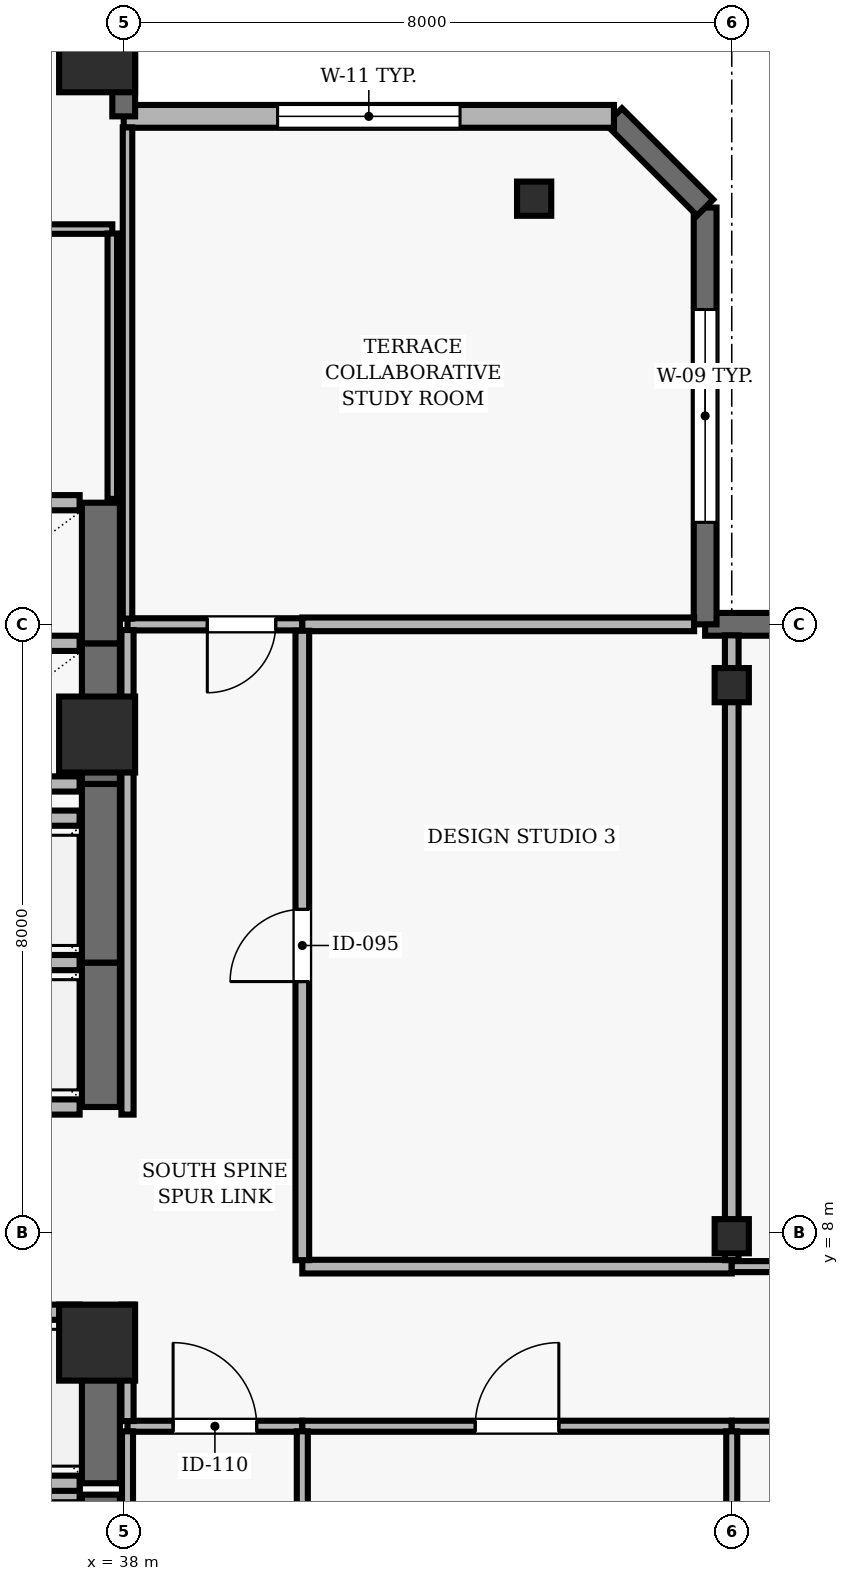
"""IFC4 building model, lengths in metres.
Left out: names, types, materials, properties, quantities, classifications, styles, units other than length and angle.
Written with IfcOpenShell. Run it as: python <this file> out.ifc"""

import sys

from ifc_helpers import new_model, si_unit, direction, frame, frame_2d, origin, origin_2d, place, context, subcontext, project, spatial, rectangle, hollow_rectangle, extrude, element, fill, save


model = new_model("IFC4")
c1 = context("Model", 3, precision=1e-05, world=origin(), true_north=direction((0.0, 1.0)))
c2 = subcontext(c1, "Body", "Model", "MODEL_VIEW")
j1 = project(units=[si_unit("LENGTHUNIT", "METRE"), si_unit("PLANEANGLEUNIT", "RADIAN")], contexts=[c1])
p1 = place(None, origin())
s1 = spatial("IfcSite", under=j1, at=p1, CompositionType="ELEMENT")
p2 = place(p1, origin())
s2 = spatial("IfcBuilding", under=s1, at=p2, CompositionType="ELEMENT")
p3 = place(p2, frame((0.0, 0.0, 210.9)))
s3 = spatial("IfcBuildingStorey", under=s2, at=p3, CompositionType="ELEMENT", Elevation=210.9)
for number, where, z_axis, x_axis in (
    (1, (37.65, 6.55, 0.0), (0.0, 0.0, 1.0), (1.0, 0.0, 0.0)),
    (2, (37.65, 14.55, 0.0), (0.0, 0.0, 1.0), (1.0, 0.0, 0.0)),
    (3, (37.65, 23.5, 0.0), (0.0, 0.0, 1.0), (1.0, 0.0, 0.0)),
):
    element("IfcColumn", number, at=place(p3, frame(where, z_axis=z_axis, x_axis=x_axis)), inside=s3, PredefinedType="COLUMN", context=c2, shape_type="SweptSolid", body=[
        extrude(rectangle(XDim=1.0, YDim=1.0, at=origin_2d()), origin(), (0.0, 0.0, 1.0), 3.9),
    ])
for number, where, z_axis, x_axis in (
    (4, (46.0, 7.95, 0.0), (0.0, 0.0, 1.0), (1.0, 0.0, 0.0)),
    (5, (46.0, 15.2, 0.0), (0.0, 0.0, 1.0), (1.0, 0.0, 0.0)),
    (6, (43.4, 21.6, 0.0), (0.0, 0.0, 1.0), (1.0, 0.0, 0.0)),
):
    element("IfcColumn", number, at=place(p3, frame(where, z_axis=z_axis, x_axis=x_axis)), inside=s3, PredefinedType="COLUMN", context=c2, shape_type="SweptSolid", body=[
        extrude(hollow_rectangle(XDim=0.45, YDim=0.45, WallThickness=0.02, at=origin_2d()), origin(), (0.0, 0.0, 1.0), 3.9),
    ])
p4 = place(p3, frame((62.7, 16.0, 0.0), z_axis=(0.0, 0.0, 1.0), x_axis=(-1.0, 0.0, 0.0)))
e7 = element("IfcWall", 7, at=p4, inside=s3, PredefinedType="SOLIDWALL", context=c2, shape_type="SweptSolid", body=[
    extrude(rectangle(XDim=17.05, YDim=0.3, at=frame_2d((8.525, 0.0))), origin(), (0.0, 0.0, 1.0), 3.69),
])
p5 = place(p4, frame((7.925, 0.0, 0.0)))
e8 = element("IfcOpeningElement", 8, at=p5, cuts=e7, PredefinedType="OPENING", context=c2, shape_type="SweptSolid", body=[
    extrude(rectangle(XDim=1.0, YDim=2.2, at=frame_2d((0.5, 1.1))), frame((0.0, 0.16, 0.0), z_axis=(0.0, -1.0, 0.0), x_axis=(1.0, 0.0, 0.0)), (0.0, 0.0, 1.0), 0.32),
])
p6 = place(p4, frame((2.542, 0.0, 0.9)))
e9 = element("IfcOpeningElement", 9, at=p6, cuts=e7, PredefinedType="OPENING", context=c2, shape_type="SweptSolid", body=[
    extrude(rectangle(XDim=2.4, YDim=1.8, at=frame_2d((1.2, 0.9))), frame((0.0, 0.16, 0.0), z_axis=(0.0, -1.0, 0.0), x_axis=(1.0, 0.0, 0.0)), (0.0, 0.0, 1.0), 0.32),
])
p7 = place(p4, frame((13.008, 0.0, 0.9)))
e10 = element("IfcOpeningElement", 10, at=p7, cuts=e7, PredefinedType="OPENING", context=c2, shape_type="SweptSolid", body=[
    extrude(rectangle(XDim=2.4, YDim=1.8, at=frame_2d((1.2, 0.9))), frame((0.0, 0.16, 0.0), z_axis=(0.0, -1.0, 0.0), x_axis=(1.0, 0.0, 0.0)), (0.0, 0.0, 1.0), 0.32),
])
p8 = place(p3, frame((45.65, 16.0, 0.0), z_axis=(0.0, 0.0, 1.0), x_axis=(0.0, 1.0, 0.0)))
e11 = element("IfcWall", 11, at=p8, inside=s3, PredefinedType="SOLIDWALL", context=c2, shape_type="SweptSolid", body=[
    extrude(rectangle(XDim=5.483, YDim=0.3, at=frame_2d((2.741, 0.0))), origin(), (0.0, 0.0, 1.0), 3.69),
])
p9 = place(p8, frame((1.342, 0.0, 0.9)))
e12 = element("IfcOpeningElement", 12, at=p9, cuts=e11, PredefinedType="OPENING", context=c2, shape_type="SweptSolid", body=[
    extrude(rectangle(XDim=2.8, YDim=1.8, at=frame_2d((1.4, 0.9))), frame((0.0, 0.16, 0.0), z_axis=(0.0, -1.0, 0.0), x_axis=(1.0, 0.0, 0.0)), (0.0, 0.0, 1.0), 0.32),
])
p10 = place(p3, frame((45.65, 21.483, 0.0), z_axis=(0.0, 0.0, 1.0), x_axis=(-0.707034851297, 0.707178703759, 0.0)))
e13 = element("IfcWall", 13, at=p10, inside=s3, PredefinedType="SOLIDWALL", context=c2, shape_type="SweptSolid", body=[
    extrude(rectangle(XDim=1.697, YDim=0.3, at=frame_2d((0.849, 0.0))), origin(), (0.0, 0.0, 1.0), 3.69),
])
p11 = place(p3, frame((44.45, 22.683, 0.0), z_axis=(0.0, 0.0, 1.0), x_axis=(-1.0, 0.0, 0.0)))
e14 = element("IfcWall", 14, at=p11, inside=s3, PredefinedType="SOLIDWALL", context=c2, shape_type="SweptSolid", body=[
    extrude(rectangle(XDim=6.45, YDim=0.3, at=frame_2d((3.225, 0.0))), origin(), (0.0, 0.0, 1.0), 3.69),
])
p12 = place(p11, frame((2.025, 0.0, 0.9)))
e15 = element("IfcOpeningElement", 15, at=p12, cuts=e14, PredefinedType="OPENING", context=c2, shape_type="SweptSolid", body=[
    extrude(rectangle(XDim=2.4, YDim=2.2, at=frame_2d((1.2, 1.1))), frame((0.0, 0.16, 0.0), z_axis=(0.0, -1.0, 0.0), x_axis=(1.0, 0.0, 0.0)), (0.0, 0.0, 1.0), 0.32),
])
p13 = place(p3, frame((38.0, 22.683, 0.0), z_axis=(0.0, 0.0, 1.0), x_axis=(0.0, 1.0, 0.0)))
e16 = element("IfcWall", 16, at=p13, inside=s3, PredefinedType="SOLIDWALL", context=c2, shape_type="SweptSolid", body=[
    extrude(rectangle(XDim=18.017, YDim=0.3, at=frame_2d((9.008, 0.0))), origin(), (0.0, 0.0, 1.0), 3.69),
])
p14 = place(p13, frame((9.708, 0.0, 0.0)))
e17 = element("IfcOpeningElement", 17, at=p14, cuts=e16, PredefinedType="OPENING", context=c2, shape_type="SweptSolid", body=[
    extrude(rectangle(XDim=1.0, YDim=2.2, at=frame_2d((0.5, 1.1))), frame((0.0, 0.16, 0.0), z_axis=(0.0, -1.0, 0.0), x_axis=(1.0, 0.0, 0.0)), (0.0, 0.0, 1.0), 0.32),
])
p15 = place(p13, frame((13.964, 0.0, 0.9)))
e18 = element("IfcOpeningElement", 18, at=p15, cuts=e16, PredefinedType="OPENING", context=c2, shape_type="SweptSolid", body=[
    extrude(rectangle(XDim=3.0, YDim=2.2, at=frame_2d((1.5, 1.1))), frame((0.0, 0.16, 0.0), z_axis=(0.0, -1.0, 0.0), x_axis=(1.0, 0.0, 0.0)), (0.0, 0.0, 1.0), 0.32),
])
p16 = place(p3, frame((37.7, 2.45, 0.0), z_axis=(0.0, 0.0, 1.0), x_axis=(0.0, 1.0, 0.0)))
e19 = element("IfcWall", 19, at=p16, inside=s3, PredefinedType="SHEAR", context=c2, shape_type="SweptSolid", body=[
    extrude(rectangle(XDim=2.1, YDim=0.5, at=frame_2d((1.05, 0.0))), origin(), (0.0, 0.0, 1.0), 3.69),
])
p17 = place(p3, frame((37.42, 4.55, 0.0), z_axis=(0.0, 0.0, 1.0), x_axis=(-1.0, 0.0, 0.0)))
e20 = element("IfcWall", 20, at=p17, inside=s3, PredefinedType="SOLIDWALL", context=c2, shape_type="SweptSolid", body=[
    extrude(rectangle(XDim=2.14, YDim=0.2, at=frame_2d((1.07, 0.0))), origin(), (0.0, 0.0, 1.0), 3.69),
])
p18 = place(p3, frame((37.7, 4.7, 0.0), z_axis=(0.0, 0.0, 1.0), x_axis=(0.0, 1.0, 0.0)))
e21 = element("IfcWall", 21, at=p18, inside=s3, PredefinedType="SHEAR", context=c2, shape_type="SweptSolid", body=[
    extrude(rectangle(XDim=2.25, YDim=0.5, at=frame_2d((1.125, 0.0))), origin(), (0.0, 0.0, 1.0), 3.69),
])
for number, where, z_axis, x_axis in (
    (22, (35.28, 4.7, 0.0), (0.0, 0.0, 1.0), (1.0, 0.0, 0.0)),
    (23, (37.42, 6.95, 0.0), (0.0, 0.0, 1.0), (-1.0, 0.0, 0.0)),
):
    element("IfcWall", number, at=place(p3, frame(where, z_axis=z_axis, x_axis=x_axis)), inside=s3, PredefinedType="SOLIDWALL", context=c2, shape_type="SweptSolid", body=[
        extrude(rectangle(XDim=2.14, YDim=0.2, at=frame_2d((1.07, 0.0))), origin(), (0.0, 0.0, 1.0), 3.69),
    ])
p19 = place(p3, frame((37.7, 9.65, 0.0), z_axis=(0.0, 0.0, 1.0), x_axis=(0.0, 1.0, 0.0)))
e24 = element("IfcWall", 24, at=p19, inside=s3, PredefinedType="SHEAR", context=c2, shape_type="SweptSolid", body=[
    extrude(rectangle(XDim=1.9, YDim=0.5, at=frame_2d((0.95, 0.0))), origin(), (0.0, 0.0, 1.0), 3.69),
])
for number, where, z_axis, x_axis in (
    (25, (35.28, 9.65, 0.0), (0.0, 0.0, 1.0), (1.0, 0.0, 0.0)),
    (26, (37.42, 11.55, 0.0), (0.0, 0.0, 1.0), (-1.0, 0.0, 0.0)),
):
    element("IfcWall", number, at=place(p3, frame(where, z_axis=z_axis, x_axis=x_axis)), inside=s3, PredefinedType="SOLIDWALL", context=c2, shape_type="SweptSolid", body=[
        extrude(rectangle(XDim=2.14, YDim=0.2, at=frame_2d((1.07, 0.0))), origin(), (0.0, 0.0, 1.0), 3.69),
    ])
p20 = place(p3, frame((37.7, 11.55, 0.0), z_axis=(0.0, 0.0, 1.0), x_axis=(0.0, 1.0, 0.0)))
e27 = element("IfcWall", 27, at=p20, inside=s3, PredefinedType="SHEAR", context=c2, shape_type="SweptSolid", body=[
    extrude(rectangle(XDim=2.35, YDim=0.5, at=frame_2d((1.175, 0.0))), origin(), (0.0, 0.0, 1.0), 3.69),
])
p21 = place(p3, frame((37.42, 13.45, 0.0), z_axis=(0.0, 0.0, 1.0), x_axis=(-1.0, 0.0, 0.0)))
e28 = element("IfcWall", 28, at=p21, inside=s3, PredefinedType="SOLIDWALL", context=c2, shape_type="SweptSolid", body=[
    extrude(rectangle(XDim=2.14, YDim=0.2, at=frame_2d((1.07, 0.0))), origin(), (0.0, 0.0, 1.0), 3.69),
])
p22 = place(p3, frame((37.7, 13.9, 0.0), z_axis=(0.0, 0.0, 1.0), x_axis=(0.0, 1.0, 0.0)))
e29 = element("IfcWall", 29, at=p22, inside=s3, PredefinedType="SHEAR", context=c2, shape_type="SweptSolid", body=[
    extrude(rectangle(XDim=1.85, YDim=0.5, at=frame_2d((0.925, 0.0))), origin(), (0.0, 0.0, 1.0), 3.69),
])
for number, where, z_axis, x_axis in (
    (30, (35.28, 13.9, 0.0), (0.0, 0.0, 1.0), (1.0, 0.0, 0.0)),
    (31, (37.42, 15.75, 0.0), (0.0, 0.0, 1.0), (-1.0, 0.0, 0.0)),
):
    element("IfcWall", number, at=place(p3, frame(where, z_axis=z_axis, x_axis=x_axis)), inside=s3, PredefinedType="SOLIDWALL", context=c2, shape_type="SweptSolid", body=[
        extrude(rectangle(XDim=2.14, YDim=0.2, at=frame_2d((1.07, 0.0))), origin(), (0.0, 0.0, 1.0), 3.69),
    ])
p23 = place(p3, frame((37.7, 15.75, 0.0), z_axis=(0.0, 0.0, 1.0), x_axis=(0.0, 1.0, 0.0)))
e32 = element("IfcWall", 32, at=p23, inside=s3, PredefinedType="SHEAR", context=c2, shape_type="SweptSolid", body=[
    extrude(rectangle(XDim=1.85, YDim=0.5, at=frame_2d((0.925, 0.0))), origin(), (0.0, 0.0, 1.0), 3.69),
])
p24 = place(p3, frame((37.42, 17.6, 0.0), z_axis=(0.0, 0.0, 1.0), x_axis=(-1.0, 0.0, 0.0)))
e33 = element("IfcWall", 33, at=p24, inside=s3, PredefinedType="SOLIDWALL", context=c2, shape_type="SweptSolid", body=[
    extrude(rectangle(XDim=2.14, YDim=0.2, at=frame_2d((1.07, 0.0))), origin(), (0.0, 0.0, 1.0), 3.69),
])
p25 = place(p3, frame((35.85, 21.2, 0.0), z_axis=(0.0, 0.0, 1.0), x_axis=(1.0, 0.0, 0.0)))
e34 = element("IfcWall", 34, at=p25, inside=s3, PredefinedType="PARTITIONING", context=c2, shape_type="SweptSolid", body=[
    extrude(rectangle(XDim=2.0, YDim=0.125, at=frame_2d((1.0, 0.0))), origin(), (0.0, 0.0, 1.0), 3.146),
])
p26 = place(p3, frame((38.05, 5.45, 0.0), z_axis=(0.0, 0.0, 1.0), x_axis=(1.0, 0.0, 0.0)))
e35 = element("IfcWall", 35, at=p26, inside=s3, PredefinedType="PARTITIONING", context=c2, shape_type="SweptSolid", body=[
    extrude(rectangle(XDim=2.3, YDim=0.145, at=frame_2d((1.15, 0.0))), origin(), (0.0, 0.0, 1.0), 3.372),
])
p27 = place(p26, frame((0.6, 0.0, 0.0)))
e36 = element("IfcOpeningElement", 36, at=p27, cuts=e35, PredefinedType="OPENING", context=c2, shape_type="SweptSolid", body=[
    extrude(rectangle(XDim=1.1, YDim=2.15, at=frame_2d((0.55, 1.075))), frame((0.0, 0.083, 0.0), z_axis=(0.0, -1.0, 0.0), x_axis=(1.0, 0.0, 0.0)), (0.0, 0.0, 1.0), 0.165),
])
p28 = place(p3, frame((40.35, 5.45, 0.0), z_axis=(0.0, 0.0, 1.0), x_axis=(1.0, 0.0, 0.0)))
e37 = element("IfcWall", 37, at=p28, inside=s3, PredefinedType="PARTITIONING", context=c2, shape_type="SweptSolid", body=[
    extrude(rectangle(XDim=5.65, YDim=0.145, at=frame_2d((2.825, 0.0))), origin(), (0.0, 0.0, 1.0), 3.372),
])
p29 = place(p28, frame((2.275, 0.0, 0.0)))
e38 = element("IfcOpeningElement", 38, at=p29, cuts=e37, PredefinedType="OPENING", context=c2, shape_type="SweptSolid", body=[
    extrude(rectangle(XDim=1.1, YDim=2.15, at=frame_2d((0.55, 1.075))), frame((0.0, 0.083, 0.0), z_axis=(0.0, -1.0, 0.0), x_axis=(1.0, 0.0, 0.0)), (0.0, 0.0, 1.0), 0.165),
])
p30 = place(p3, frame((40.35, 16.0, 0.0), z_axis=(0.0, 0.0, 1.0), x_axis=(-1.0, 0.0, 0.0)))
e39 = element("IfcWall", 39, at=p30, inside=s3, PredefinedType="PARTITIONING", context=c2, shape_type="SweptSolid", body=[
    extrude(rectangle(XDim=2.3, YDim=0.16, at=frame_2d((1.15, 0.0))), origin(), (0.0, 0.0, 1.0), 3.39),
])
p31 = place(p30, frame((0.35, 0.0, 0.0)))
e40 = element("IfcOpeningElement", 40, at=p31, cuts=e39, PredefinedType="OPENING", context=c2, shape_type="SweptSolid", body=[
    extrude(rectangle(XDim=0.9, YDim=2.1, at=frame_2d((0.45, 1.05))), frame((0.0, 0.09, 0.0), z_axis=(0.0, -1.0, 0.0), x_axis=(1.0, 0.0, 0.0)), (0.0, 0.0, 1.0), 0.18),
])
p32 = place(p3, frame((40.35, 16.0, 0.0), z_axis=(0.0, 0.0, 1.0), x_axis=(1.0, 0.0, 0.0)))
e41 = element("IfcWall", 41, at=p32, inside=s3, PredefinedType="PARTITIONING", context=c2, shape_type="SweptSolid", body=[
    extrude(rectangle(XDim=5.155, YDim=0.18, at=frame_2d((2.577, 0.0))), origin(), (0.0, 0.0, 1.0), 3.39),
])
p33 = place(p3, frame((46.0, 5.45, 0.0), z_axis=(0.0, 0.0, 1.0), x_axis=(1.0, 0.0, 0.0)))
e42 = element("IfcWall", 42, at=p33, inside=s3, PredefinedType="PARTITIONING", context=c2, shape_type="SweptSolid", body=[
    extrude(rectangle(XDim=4.79, YDim=0.145, at=frame_2d((2.395, 0.0))), origin(), (0.0, 0.0, 1.0), 3.372),
])
p34 = place(p33, frame((1.845, 0.0, 0.0)))
e43 = element("IfcOpeningElement", 43, at=p34, cuts=e42, PredefinedType="OPENING", context=c2, shape_type="SweptSolid", body=[
    extrude(rectangle(XDim=1.1, YDim=2.15, at=frame_2d((0.55, 1.075))), frame((0.0, 0.083, 0.0), z_axis=(0.0, -1.0, 0.0), x_axis=(1.0, 0.0, 0.0)), (0.0, 0.0, 1.0), 0.165),
])
p35 = place(p3, frame((46.0, 7.55, 0.0), z_axis=(0.0, 0.0, 1.0), x_axis=(-1.0, 0.0, 0.0)))
e44 = element("IfcWall", 44, at=p35, inside=s3, PredefinedType="PARTITIONING", context=c2, shape_type="SweptSolid", body=[
    extrude(rectangle(XDim=5.65, YDim=0.18, at=frame_2d((2.825, 0.0))), origin(), (0.0, 0.0, 1.0), 3.146),
])
p36 = place(p3, frame((50.79, 7.55, 0.0), z_axis=(0.0, 0.0, 1.0), x_axis=(-1.0, 0.0, 0.0)))
e45 = element("IfcWall", 45, at=p36, inside=s3, PredefinedType="PARTITIONING", context=c2, shape_type="SweptSolid", body=[
    extrude(rectangle(XDim=4.79, YDim=0.145, at=frame_2d((2.395, 0.0))), origin(), (0.0, 0.0, 1.0), 3.146),
])
p37 = place(p36, frame((1.845, 0.0, 0.0)))
e46 = element("IfcOpeningElement", 46, at=p37, cuts=e45, PredefinedType="OPENING", context=c2, shape_type="SweptSolid", body=[
    extrude(rectangle(XDim=1.1, YDim=2.15, at=frame_2d((0.55, 1.075))), frame((0.0, 0.083, 0.0), z_axis=(0.0, -1.0, 0.0), x_axis=(1.0, 0.0, 0.0)), (0.0, 0.0, 1.0), 0.165),
])
p38 = place(p3, frame((37.85, 17.65, 0.0), z_axis=(0.0, 0.0, 1.0), x_axis=(0.0, 1.0, 0.0)))
e47 = element("IfcWall", 47, at=p38, inside=s3, PredefinedType="PARTITIONING", context=c2, shape_type="SweptSolid", body=[
    extrude(rectangle(XDim=3.492, YDim=0.125, at=frame_2d((1.746, 0.0))), origin(), (0.0, 0.0, 1.0), 3.146),
])
p39 = place(p3, frame((38.05, 5.383, 0.0), z_axis=(0.0, 0.0, 1.0), x_axis=(0.0, -1.0, 0.0)))
e48 = element("IfcWall", 48, at=p39, inside=s3, PredefinedType="PARTITIONING", context=c2, shape_type="SweptSolid", body=[
    extrude(rectangle(XDim=5.238, YDim=0.145, at=frame_2d((2.619, 0.0))), origin(), (0.0, 0.0, 1.0), 3.146),
])
p40 = place(p3, frame((38.05, 7.05, 0.0), z_axis=(0.0, 0.0, 1.0), x_axis=(0.0, -1.0, 0.0)))
e49 = element("IfcWall", 49, at=p40, inside=s3, PredefinedType="PARTITIONING", context=c2, shape_type="SweptSolid", body=[
    extrude(rectangle(XDim=1.532, YDim=0.16, at=frame_2d((0.766, 0.0))), origin(), (0.0, 0.0, 1.0), 3.146),
])
p41 = place(p3, frame((38.05, 15.925, 0.0), z_axis=(0.0, 0.0, 1.0), x_axis=(0.0, -1.0, 0.0)))
e50 = element("IfcWall", 50, at=p41, inside=s3, PredefinedType="PARTITIONING", context=c2, shape_type="SweptSolid", body=[
    extrude(rectangle(XDim=6.375, YDim=0.16, at=frame_2d((3.188, 0.0))), origin(), (0.0, 0.0, 1.0), 3.146),
])
p42 = place(p3, frame((38.05, 22.538, 0.0), z_axis=(0.0, 0.0, 1.0), x_axis=(0.0, -1.0, 0.0)))
e51 = element("IfcWall", 51, at=p42, inside=s3, PredefinedType="PARTITIONING", context=c2, shape_type="SweptSolid", body=[
    extrude(rectangle(XDim=6.463, YDim=0.125, at=frame_2d((3.231, 0.0))), origin(), (0.0, 0.0, 1.0), 3.146),
])
p43 = place(p3, frame((40.35, 0.145, 0.0), z_axis=(0.0, 0.0, 1.0), x_axis=(0.0, 1.0, 0.0)))
e52 = element("IfcWall", 52, at=p43, inside=s3, PredefinedType="PARTITIONING", context=c2, shape_type="SweptSolid", body=[
    extrude(rectangle(XDim=5.238, YDim=0.145, at=frame_2d((2.619, 0.0))), origin(), (0.0, 0.0, 1.0), 3.69),
])
p44 = place(p3, frame((40.35, 7.635, 0.0), z_axis=(0.0, 0.0, 1.0), x_axis=(0.0, 1.0, 0.0)))
e53 = element("IfcWall", 53, at=p44, inside=s3, PredefinedType="PARTITIONING", context=c2, shape_type="SweptSolid", body=[
    extrude(rectangle(XDim=8.28, YDim=0.18, at=frame_2d((4.14, 0.0))), origin(), (0.0, 0.0, 1.0), 3.372),
])
p45 = place(p44, frame((3.665, 0.0, 0.0)))
e54 = element("IfcOpeningElement", 54, at=p45, cuts=e53, PredefinedType="OPENING", context=c2, shape_type="SweptSolid", body=[
    extrude(rectangle(XDim=0.95, YDim=2.1, at=frame_2d((0.475, 1.05))), frame((0.0, 0.1, 0.0), z_axis=(0.0, -1.0, 0.0), x_axis=(1.0, 0.0, 0.0)), (0.0, 0.0, 1.0), 0.2),
])
p46 = place(p3, frame((46.0, 0.145, 0.0), z_axis=(0.0, 0.0, 1.0), x_axis=(0.0, 1.0, 0.0)))
e55 = element("IfcWall", 55, at=p46, inside=s3, PredefinedType="PARTITIONING", context=c2, shape_type="SweptSolid", body=[
    extrude(rectangle(XDim=5.238, YDim=0.145, at=frame_2d((2.619, 0.0))), origin(), (0.0, 0.0, 1.0), 3.146),
])
p47 = place(p3, frame((46.0, 7.635, 0.0), z_axis=(0.0, 0.0, 1.0), x_axis=(0.0, 1.0, 0.0)))
e56 = element("IfcWall", 56, at=p47, inside=s3, PredefinedType="PARTITIONING", context=c2, shape_type="SweptSolid", body=[
    extrude(rectangle(XDim=8.22, YDim=0.18, at=frame_2d((4.11, 0.0))), origin(), (0.0, 0.0, 1.0), 3.146),
])
p48 = place(p9, origin())
e57 = element("IfcWindow", 57, at=p48, inside=s3, PartitioningType="SINGLE_PANEL", PredefinedType="WINDOW", context=c2, shape_type="SweptSolid", body=[
    extrude(rectangle(XDim=2.8, YDim=1.8, at=frame_2d((1.4, 0.9))), frame((0.0, 0.03, 0.0), z_axis=(0.0, -1.0, 0.0), x_axis=(1.0, 0.0, 0.0)), (0.0, 0.0, 1.0), 0.06),
])
fill(e12, e57)
p49 = place(p12, origin())
e58 = element("IfcWindow", 58, at=p49, inside=s3, PartitioningType="SINGLE_PANEL", PredefinedType="WINDOW", context=c2, shape_type="SweptSolid", body=[
    extrude(rectangle(XDim=2.4, YDim=2.2, at=frame_2d((1.2, 1.1))), frame((0.0, 0.03, 0.0), z_axis=(0.0, -1.0, 0.0), x_axis=(1.0, 0.0, 0.0)), (0.0, 0.0, 1.0), 0.06),
])
fill(e15, e58)
p50 = place(p27, origin())
e59 = element("IfcDoor", 59, at=p50, inside=s3, OperationType="SINGLE_SWING_LEFT", PredefinedType="DOOR", context=c2, shape_type="SweptSolid", body=[
    extrude(rectangle(XDim=1.1, YDim=2.15, at=frame_2d((0.55, 1.075))), frame((0.0, 0.025, 0.0), z_axis=(0.0, -1.0, 0.0), x_axis=(1.0, 0.0, 0.0)), (0.0, 0.0, 1.0), 0.05),
])
fill(e36, e59)
p51 = place(p29, origin())
e60 = element("IfcDoor", 60, at=p51, inside=s3, OperationType="SINGLE_SWING_RIGHT", PredefinedType="DOOR", context=c2, shape_type="SweptSolid", body=[
    extrude(rectangle(XDim=1.1, YDim=2.15, at=frame_2d((0.55, 1.075))), frame((0.0, 0.025, 0.0), z_axis=(0.0, -1.0, 0.0), x_axis=(1.0, 0.0, 0.0)), (0.0, 0.0, 1.0), 0.05),
])
fill(e38, e60)
p52 = place(p45, origin())
e61 = element("IfcDoor", 61, at=p52, inside=s3, OperationType="SINGLE_SWING_LEFT", PredefinedType="DOOR", context=c2, shape_type="SweptSolid", body=[
    extrude(rectangle(XDim=0.95, YDim=2.1, at=frame_2d((0.475, 1.05))), frame((0.0, 0.025, 0.0), z_axis=(0.0, -1.0, 0.0), x_axis=(1.0, 0.0, 0.0)), (0.0, 0.0, 1.0), 0.05),
])
fill(e54, e61)
p53 = place(p31, origin())
e62 = element("IfcDoor", 62, at=p53, inside=s3, OperationType="SINGLE_SWING_RIGHT", PredefinedType="DOOR", context=c2, shape_type="SweptSolid", body=[
    extrude(rectangle(XDim=0.9, YDim=2.1, at=frame_2d((0.45, 1.05))), frame((0.0, 0.025, 0.0), z_axis=(0.0, -1.0, 0.0), x_axis=(1.0, 0.0, 0.0)), (0.0, 0.0, 1.0), 0.05),
])
fill(e40, e62)
save(model, sys.argv[1])
